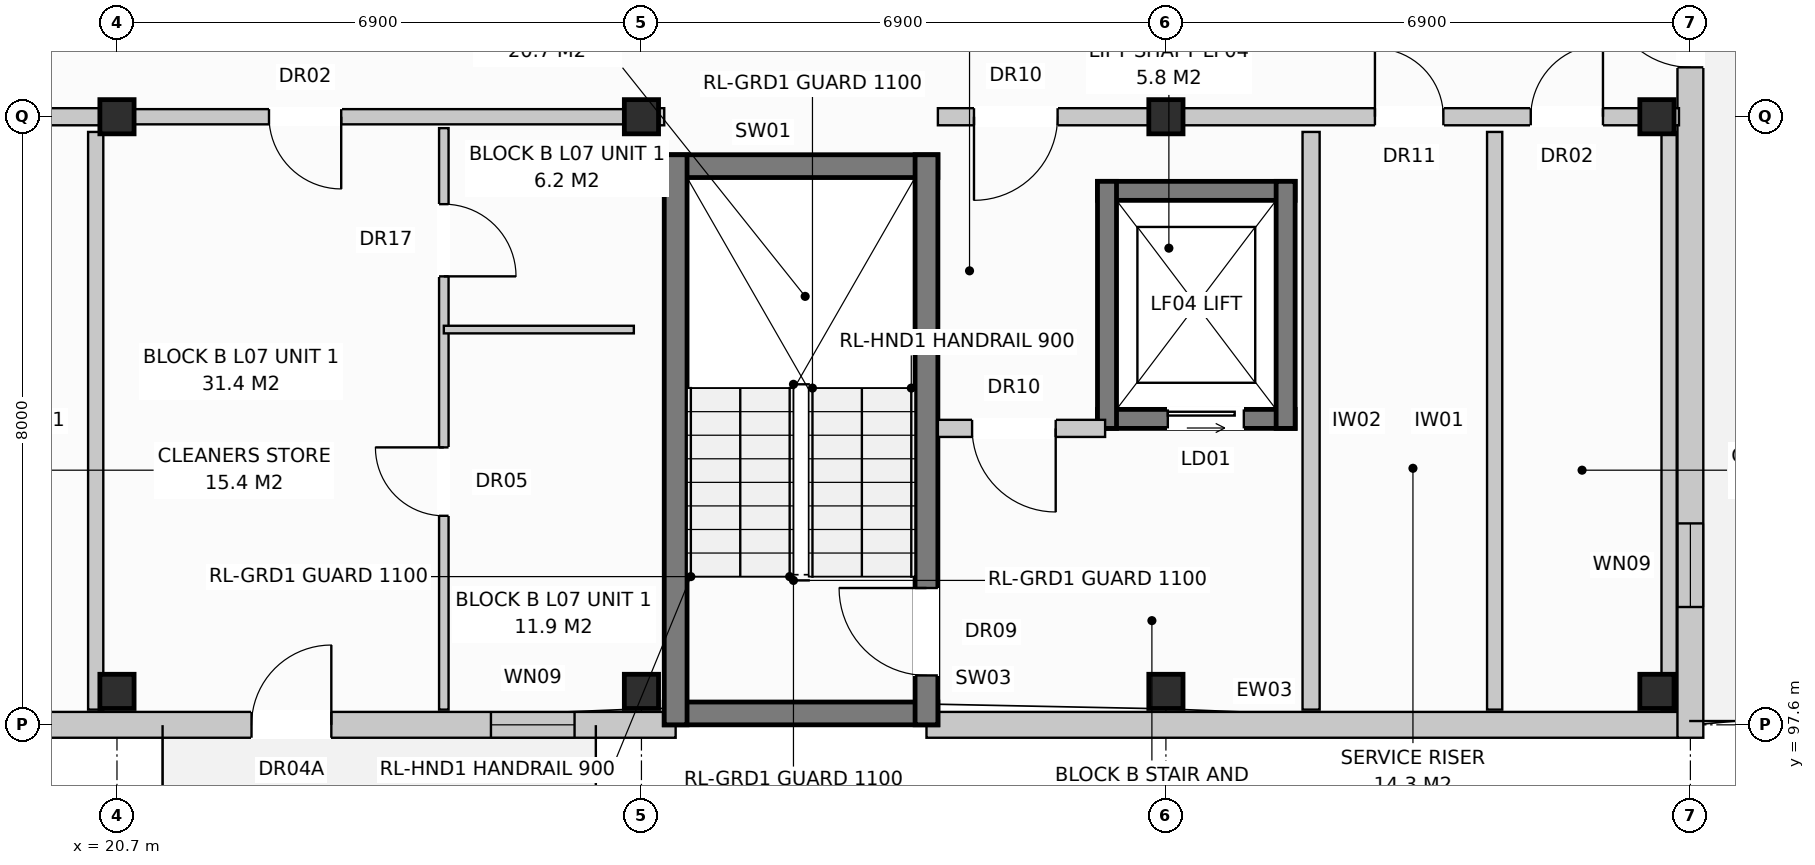
"""IFC4 building model, lengths in metres.
Left out: names, types, materials, properties, quantities, classifications, styles, units other than length and angle.
Written with IfcOpenShell. Run it as: python <this file> out.ifc"""

import sys

from ifc_helpers import new_model, si_unit, direction, frame, frame_2d, origin, origin_with_axes, origin_2d, place, context, subcontext, project, spatial, rectangle, extrude, element, fill, save


model = new_model("IFC4")
c1 = context("Model", 3, precision=1e-05, world=origin(), true_north=direction((0.0, 1.0)))
c2 = subcontext(c1, "Body", "Model", "MODEL_VIEW")
j1 = project(units=[si_unit("LENGTHUNIT", "METRE"), si_unit("PLANEANGLEUNIT", "RADIAN")], contexts=[c1])
p1 = place(None, origin())
s1 = spatial("IfcSite", under=j1, at=p1, CompositionType="ELEMENT")
p2 = place(p1, origin())
s2 = spatial("IfcBuilding", under=s1, at=p2, CompositionType="ELEMENT")
p3 = place(p2, frame((0.0, 0.0, 24.0)))
s3 = spatial("IfcBuildingStorey", under=s2, at=p3, CompositionType="ELEMENT", Elevation=24.0)
for number, where, z_axis, x_axis in (
    (1, (20.7, 98.04, 0.0), (0.0, 0.0, 1.0), (1.0, 0.0, 0.0)),
    (2, (20.7, 105.6, 0.0), (0.0, 0.0, 1.0), (1.0, 0.0, 0.0)),
    (3, (27.6, 98.04, 0.0), (0.0, 0.0, 1.0), (1.0, 0.0, 0.0)),
    (4, (27.6, 105.6, 0.0), (0.0, 0.0, 1.0), (1.0, 0.0, 0.0)),
    (5, (34.5, 98.04, 0.0), (0.0, 0.0, 1.0), (1.0, 0.0, 0.0)),
    (6, (34.5, 105.6, 0.0), (0.0, 0.0, 1.0), (1.0, 0.0, 0.0)),
    (7, (40.96, 98.04, 0.0), (0.0, 0.0, 1.0), (1.0, 0.0, 0.0)),
    (8, (40.96, 105.6, 0.0), (0.0, 0.0, 1.0), (1.0, 0.0, 0.0)),
):
    element("IfcColumn", number, at=place(p3, frame(where, z_axis=z_axis, x_axis=x_axis)), inside=s3, PredefinedType="COLUMN", context=c2, shape_type="SweptSolid", body=[
        extrude(rectangle(XDim=0.45, YDim=0.45, at=origin_2d()), origin(), (0.0, 0.0, 1.0), 3.2),
    ])
p4 = place(p3, frame((10.65, 97.6, 0.0), z_axis=(0.0, 0.0, 1.0), x_axis=(1.0, 0.0, 0.0)))
e9 = element("IfcWall", 9, at=p4, inside=s3, PredefinedType="STANDARD", context=c2, shape_type="SweptSolid", body=[
    extrude(rectangle(XDim=17.4, YDim=0.34, at=frame_2d((8.7, 0.0))), origin(), (0.0, 0.0, 1.0), 2.95),
])
p5 = place(p4, frame((11.82, 0.0, 0.0)))
e10 = element("IfcOpeningElement", 10, at=p5, cuts=e9, PredefinedType="OPENING", context=c2, shape_type="SweptSolid", body=[
    extrude(rectangle(XDim=1.05, YDim=2.12, at=frame_2d((0.525, 1.06))), frame((0.0, 0.182, 0.0), z_axis=(0.0, -1.0, 0.0), x_axis=(1.0, 0.0, 0.0)), (0.0, 0.0, 1.0), 0.364),
])
p6 = place(p4, frame((14.97, 0.0, 0.72)))
e11 = element("IfcOpeningElement", 11, at=p6, cuts=e9, PredefinedType="OPENING", context=c2, shape_type="SweptSolid", body=[
    extrude(rectangle(XDim=1.1, YDim=1.5, at=frame_2d((0.55, 0.75))), frame((0.0, 0.182, 0.0), z_axis=(0.0, -1.0, 0.0), x_axis=(1.0, 0.0, 0.0)), (0.0, 0.0, 1.0), 0.364),
])
p7 = place(p3, frame((31.35, 97.6, 0.0), z_axis=(0.0, 0.0, 1.0), x_axis=(1.0, 0.0, 0.0)))
e12 = element("IfcWall", 12, at=p7, inside=s3, PredefinedType="STANDARD", context=c2, shape_type="SweptSolid", body=[
    extrude(rectangle(XDim=9.89, YDim=0.34, at=frame_2d((4.945, 0.0))), origin(), (0.0, 0.0, 1.0), 2.95),
])
p8 = place(p3, frame((41.4, 97.43, 0.0), z_axis=(0.0, 0.0, 1.0), x_axis=(0.0, 1.0, 0.0)))
e13 = element("IfcWall", 13, at=p8, inside=s3, PredefinedType="STANDARD", context=c2, shape_type="SweptSolid", body=[
    extrude(rectangle(XDim=18.74, YDim=0.34, at=frame_2d((9.37, 0.0))), origin(), (0.0, 0.0, 1.0), 2.95),
])
p9 = place(p8, frame((8.82, 0.0, 0.0)))
e14 = element("IfcOpeningElement", 14, at=p9, cuts=e13, PredefinedType="OPENING", context=c2, shape_type="SweptSolid", body=[
    extrude(rectangle(XDim=1.1, YDim=2.1, at=frame_2d((0.55, 1.05))), frame((0.0, 0.182, 0.0), z_axis=(0.0, -1.0, 0.0), x_axis=(1.0, 0.0, 0.0)), (0.0, 0.0, 1.0), 0.364),
])
p10 = place(p8, frame((15.82, 0.0, 0.0)))
e15 = element("IfcOpeningElement", 15, at=p10, cuts=e13, PredefinedType="OPENING", context=c2, shape_type="SweptSolid", body=[
    extrude(rectangle(XDim=1.1, YDim=2.1, at=frame_2d((0.55, 1.05))), frame((0.0, 0.182, 0.0), z_axis=(0.0, -1.0, 0.0), x_axis=(1.0, 0.0, 0.0)), (0.0, 0.0, 1.0), 0.364),
])
p11 = place(p8, frame((1.72, 0.0, 0.72)))
e16 = element("IfcOpeningElement", 16, at=p11, cuts=e13, PredefinedType="OPENING", context=c2, shape_type="SweptSolid", body=[
    extrude(rectangle(XDim=1.1, YDim=1.5, at=frame_2d((0.55, 0.75))), frame((0.0, 0.182, 0.0), z_axis=(0.0, -1.0, 0.0), x_axis=(1.0, 0.0, 0.0)), (0.0, 0.0, 1.0), 0.364),
])
p12 = place(p3, frame((20.42, 97.8, 0.0), z_axis=(0.0, 0.0, 1.0), x_axis=(0.0, 1.0, 0.0)))
e17 = element("IfcWall", 17, at=p12, inside=s3, PredefinedType="PARTITIONING", context=c2, shape_type="SweptSolid", body=[
    extrude(rectangle(XDim=7.6, YDim=0.2, at=frame_2d((3.8, 0.0))), origin(), (0.0, 0.0, 1.0), 2.95),
])
p13 = place(p3, frame((10.8, 105.6, 0.0), z_axis=(0.0, 0.0, 1.0), x_axis=(1.0, 0.0, 0.0)))
e18 = element("IfcWall", 18, at=p13, inside=s3, PredefinedType="PARTITIONING", context=c2, shape_type="SweptSolid", body=[
    extrude(rectangle(XDim=9.9, YDim=0.225, at=frame_2d((4.95, 0.0))), origin(), (0.0, 0.0, 1.0), 2.39),
])
p14 = place(p13, frame((0.475, 0.0, 0.0)))
e19 = element("IfcOpeningElement", 19, at=p14, cuts=e18, PredefinedType="OPENING", context=c2, shape_type="SweptSolid", body=[
    extrude(rectangle(XDim=1.1, YDim=2.15, at=frame_2d((0.55, 1.075))), frame((0.0, 0.125, 0.0), z_axis=(0.0, -1.0, 0.0), x_axis=(1.0, 0.0, 0.0)), (0.0, 0.0, 1.0), 0.249),
])
p15 = place(p13, frame((5.75, 0.0, 0.0)))
e20 = element("IfcOpeningElement", 20, at=p15, cuts=e18, PredefinedType="OPENING", context=c2, shape_type="SweptSolid", body=[
    extrude(rectangle(XDim=0.9, YDim=2.1, at=frame_2d((0.45, 1.05))), frame((0.0, 0.125, 0.0), z_axis=(0.0, -1.0, 0.0), x_axis=(1.0, 0.0, 0.0)), (0.0, 0.0, 1.0), 0.249),
])
p16 = place(p13, frame((7.8, 0.0, 0.0)))
e21 = element("IfcOpeningElement", 21, at=p16, cuts=e18, PredefinedType="OPENING", context=c2, shape_type="SweptSolid", body=[
    extrude(rectangle(XDim=0.95, YDim=2.15, at=frame_2d((0.475, 1.075))), frame((0.0, 0.125, 0.0), z_axis=(0.0, -1.0, 0.0), x_axis=(1.0, 0.0, 0.0)), (0.0, 0.0, 1.0), 0.249),
])
for number, where, z_axis, x_axis in (
    (22, (27.9, 97.75, 0.0), (0.0, 0.0, 1.0), (1.0, 0.0, 0.0)),
    (23, (27.9, 104.95, 0.0), (0.0, 0.0, 1.0), (1.0, 0.0, 0.0)),
):
    element("IfcWall", number, at=place(p3, frame(where, z_axis=z_axis, x_axis=x_axis)), inside=s3, PredefinedType="SHEAR", context=c2, shape_type="SweptSolid", body=[
        extrude(rectangle(XDim=3.6, YDim=0.3, at=frame_2d((1.8, 0.0))), origin(), (0.0, 0.0, 1.0), 2.95),
    ])
p17 = place(p3, frame((28.05, 97.6, 0.0), z_axis=(0.0, 0.0, 1.0), x_axis=(0.0, 1.0, 0.0)))
e24 = element("IfcWall", 24, at=p17, inside=s3, PredefinedType="SHEAR", context=c2, shape_type="SweptSolid", body=[
    extrude(rectangle(XDim=7.5, YDim=0.3, at=frame_2d((3.75, 0.0))), origin(), (0.0, 0.0, 1.0), 2.95),
])
p18 = place(p3, frame((31.35, 97.6, 0.0), z_axis=(0.0, 0.0, 1.0), x_axis=(0.0, 1.0, 0.0)))
e25 = element("IfcWall", 25, at=p18, inside=s3, PredefinedType="SHEAR", context=c2, shape_type="SweptSolid", body=[
    extrude(rectangle(XDim=7.5, YDim=0.3, at=frame_2d((3.75, 0.0))), origin(), (0.0, 0.0, 1.0), 2.95),
])
p19 = place(p18, frame((0.65, 0.0, 0.0)))
e26 = element("IfcOpeningElement", 26, at=p19, cuts=e25, PredefinedType="OPENING", context=c2, shape_type="SweptSolid", body=[
    extrude(rectangle(XDim=1.15, YDim=2.15, at=frame_2d((0.575, 1.075))), frame((0.0, 0.162, 0.0), z_axis=(0.0, -1.0, 0.0), x_axis=(1.0, 0.0, 0.0)), (0.0, 0.0, 1.0), 0.324),
])
p20 = place(p3, frame((33.6, 101.625, 0.0), z_axis=(0.0, 0.0, 1.0), x_axis=(1.0, 0.0, 0.0)))
e27 = element("IfcWall", 27, at=p20, inside=s3, PredefinedType="SHEAR", context=c2, shape_type="SweptSolid", body=[
    extrude(rectangle(XDim=2.6, YDim=0.25, at=frame_2d((1.3, 0.0))), origin(), (0.0, 0.0, 1.0), 2.95),
])
p21 = place(p20, frame((0.925, 0.0, 0.0)))
e28 = element("IfcOpeningElement", 28, at=p21, cuts=e27, PredefinedType="OPENING", context=c2, shape_type="SweptSolid", body=[
    extrude(rectangle(XDim=1.0, YDim=2.1, at=frame_2d((0.5, 1.05))), frame((0.0, 0.137, 0.0), z_axis=(0.0, -1.0, 0.0), x_axis=(1.0, 0.0, 0.0)), (0.0, 0.0, 1.0), 0.274),
])
p22 = place(p3, frame((33.6, 104.625, 0.0), z_axis=(0.0, 0.0, 1.0), x_axis=(1.0, 0.0, 0.0)))
e29 = element("IfcWall", 29, at=p22, inside=s3, PredefinedType="SHEAR", context=c2, shape_type="SweptSolid", body=[
    extrude(rectangle(XDim=2.6, YDim=0.25, at=frame_2d((1.3, 0.0))), origin(), (0.0, 0.0, 1.0), 2.95),
])
for number, where, z_axis, x_axis in (
    (30, (33.725, 101.5, 0.0), (0.0, 0.0, 1.0), (0.0, 1.0, 0.0)),
    (31, (36.075, 101.5, 0.0), (0.0, 0.0, 1.0), (0.0, 1.0, 0.0)),
):
    element("IfcWall", number, at=place(p3, frame(where, z_axis=z_axis, x_axis=x_axis)), inside=s3, PredefinedType="SHEAR", context=c2, shape_type="SweptSolid", body=[
        extrude(rectangle(XDim=3.25, YDim=0.25, at=frame_2d((1.625, 0.0))), origin(), (0.0, 0.0, 1.0), 2.95),
    ])
p23 = place(p3, frame((36.41, 97.8, 0.0), z_axis=(0.0, 0.0, 1.0), x_axis=(0.0, 1.0, 0.0)))
e32 = element("IfcWall", 32, at=p23, inside=s3, PredefinedType="PARTITIONING", context=c2, shape_type="SweptSolid", body=[
    extrude(rectangle(XDim=7.6, YDim=0.225, at=frame_2d((3.8, 0.0))), origin(), (0.0, 0.0, 1.0), 2.59),
])
p24 = place(p3, frame((31.5, 101.5, 0.0), z_axis=(0.0, 0.0, 1.0), x_axis=(1.0, 0.0, 0.0)))
e33 = element("IfcWall", 33, at=p24, inside=s3, PredefinedType="PARTITIONING", context=c2, shape_type="SweptSolid", body=[
    extrude(rectangle(XDim=2.2, YDim=0.225, at=frame_2d((1.1, 0.0))), origin(), (0.0, 0.0, 1.0), 2.95),
])
p25 = place(p24, frame((0.45, 0.0, 0.0)))
e34 = element("IfcOpeningElement", 34, at=p25, cuts=e33, PredefinedType="OPENING", context=c2, shape_type="SweptSolid", body=[
    extrude(rectangle(XDim=1.1, YDim=2.15, at=frame_2d((0.55, 1.075))), frame((0.0, 0.125, 0.0), z_axis=(0.0, -1.0, 0.0), x_axis=(1.0, 0.0, 0.0)), (0.0, 0.0, 1.0), 0.249),
])
p26 = place(p3, frame((27.6, 105.6, 0.0), z_axis=(0.0, 0.0, 1.0), x_axis=(1.0, 0.0, 0.0)))
e35 = element("IfcWall", 35, at=p26, inside=s3, PredefinedType="PARTITIONING", context=c2, shape_type="SweptSolid", body=[
    extrude(rectangle(XDim=0.3, YDim=0.225, at=frame_2d((0.15, 0.0))), origin(), (0.0, 0.0, 1.0), 2.95),
])
p27 = place(p3, frame((38.825, 97.8, 0.0), z_axis=(0.0, 0.0, 1.0), x_axis=(0.0, 1.0, 0.0)))
e36 = element("IfcWall", 36, at=p27, inside=s3, PredefinedType="PARTITIONING", context=c2, shape_type="SweptSolid", body=[
    extrude(rectangle(XDim=7.6, YDim=0.2, at=frame_2d((3.8, 0.0))), origin(), (0.0, 0.0, 1.0), 2.95),
])
p28 = place(p3, frame((41.12, 97.8, 0.0), z_axis=(0.0, 0.0, 1.0), x_axis=(0.0, 1.0, 0.0)))
e37 = element("IfcWall", 37, at=p28, inside=s3, PredefinedType="PARTITIONING", context=c2, shape_type="SweptSolid", body=[
    extrude(rectangle(XDim=7.6, YDim=0.2, at=frame_2d((3.8, 0.0))), origin(), (0.0, 0.0, 1.0), 2.39),
])
p29 = place(p3, frame((31.5, 105.6, 0.0), z_axis=(0.0, 0.0, 1.0), x_axis=(1.0, 0.0, 0.0)))
e38 = element("IfcWall", 38, at=p29, inside=s3, PredefinedType="PARTITIONING", context=c2, shape_type="SweptSolid", body=[
    extrude(rectangle(XDim=9.75, YDim=0.225, at=frame_2d((4.875, 0.0))), origin(), (0.0, 0.0, 1.0), 2.39),
])
p30 = place(p29, frame((0.475, 0.0, 0.0)))
e39 = element("IfcOpeningElement", 39, at=p30, cuts=e38, PredefinedType="OPENING", context=c2, shape_type="SweptSolid", body=[
    extrude(rectangle(XDim=1.1, YDim=2.15, at=frame_2d((0.55, 1.075))), frame((0.0, 0.125, 0.0), z_axis=(0.0, -1.0, 0.0), x_axis=(1.0, 0.0, 0.0)), (0.0, 0.0, 1.0), 0.249),
])
p31 = place(p29, frame((5.75, 0.0, 0.0)))
e40 = element("IfcOpeningElement", 40, at=p31, cuts=e38, PredefinedType="OPENING", context=c2, shape_type="SweptSolid", body=[
    extrude(rectangle(XDim=0.9, YDim=2.1, at=frame_2d((0.45, 1.05))), frame((0.0, 0.125, 0.0), z_axis=(0.0, -1.0, 0.0), x_axis=(1.0, 0.0, 0.0)), (0.0, 0.0, 1.0), 0.249),
])
p32 = place(p29, frame((7.8, 0.0, 0.0)))
e41 = element("IfcOpeningElement", 41, at=p32, cuts=e38, PredefinedType="OPENING", context=c2, shape_type="SweptSolid", body=[
    extrude(rectangle(XDim=0.95, YDim=2.15, at=frame_2d((0.475, 1.075))), frame((0.0, 0.125, 0.0), z_axis=(0.0, -1.0, 0.0), x_axis=(1.0, 0.0, 0.0)), (0.0, 0.0, 1.0), 0.249),
])
p33 = place(p3, frame((20.7, 105.6, 0.0), z_axis=(0.0, 0.0, 1.0), x_axis=(1.0, 0.0, 0.0)))
e42 = element("IfcWall", 42, at=p33, inside=s3, PredefinedType="PARTITIONING", context=c2, shape_type="SweptSolid", body=[
    extrude(rectangle(XDim=6.9, YDim=0.2, at=frame_2d((3.45, 0.0))), origin(), (0.0, 0.0, 1.0), 2.39),
])
p34 = place(p33, frame((2.0, 0.0, 0.0)))
e43 = element("IfcOpeningElement", 43, at=p34, cuts=e42, PredefinedType="OPENING", context=c2, shape_type="SweptSolid", body=[
    extrude(rectangle(XDim=0.95, YDim=2.15, at=frame_2d((0.475, 1.075))), frame((0.0, 0.112, 0.0), z_axis=(0.0, -1.0, 0.0), x_axis=(1.0, 0.0, 0.0)), (0.0, 0.0, 1.0), 0.224),
])
p35 = place(p3, frame((25.0, 105.45, 0.0), z_axis=(0.0, 0.0, 1.0), x_axis=(0.0, -1.0, 0.0)))
e44 = element("IfcWall", 44, at=p35, inside=s3, PredefinedType="PARTITIONING", context=c2, shape_type="SweptSolid", body=[
    extrude(rectangle(XDim=7.65, YDim=0.125, at=frame_2d((3.825, 0.0))), origin(), (0.0, 0.0, 1.0), 2.95),
])
p36 = place(p35, frame((1.0, 0.0, 0.0)))
e45 = element("IfcOpeningElement", 45, at=p36, cuts=e44, PredefinedType="OPENING", context=c2, shape_type="SweptSolid", body=[
    extrude(rectangle(XDim=0.95, YDim=2.1, at=frame_2d((0.475, 1.05))), frame((0.0, 0.074, 0.0), z_axis=(0.0, -1.0, 0.0), x_axis=(1.0, 0.0, 0.0)), (0.0, 0.0, 1.0), 0.149),
])
p37 = place(p35, frame((4.2, 0.0, 0.0)))
e46 = element("IfcOpeningElement", 46, at=p37, cuts=e44, PredefinedType="OPENING", context=c2, shape_type="SweptSolid", body=[
    extrude(rectangle(XDim=0.9, YDim=2.1, at=frame_2d((0.45, 1.05))), frame((0.0, 0.074, 0.0), z_axis=(0.0, -1.0, 0.0), x_axis=(1.0, 0.0, 0.0)), (0.0, 0.0, 1.0), 0.149),
])
p38 = place(p3, frame((25.0, 102.8, 0.0), z_axis=(0.0, 0.0, 1.0), x_axis=(1.0, 0.0, 0.0)))
e47 = element("IfcWall", 47, at=p38, inside=s3, PredefinedType="PARTITIONING", context=c2, shape_type="SweptSolid", body=[
    extrude(rectangle(XDim=2.5, YDim=0.1, at=frame_2d((1.25, 0.0))), origin(), (0.0, 0.0, 1.0), 2.95),
])
p39 = place(p5, origin_with_axes())
e48 = element("IfcDoor", 48, at=p39, inside=s3, OperationType="SINGLE_SWING_RIGHT", PredefinedType="DOOR", context=c2, shape_type="SweptSolid", body=[
    extrude(rectangle(XDim=1.05, YDim=2.12, at=frame_2d((0.525, 1.06))), frame((0.0, 0.025, 0.0), z_axis=(0.0, -1.0, 0.0), x_axis=(1.0, 0.0, 0.0)), (0.0, 0.0, 1.0), 0.05),
])
fill(e10, e48)
p40 = place(p6, origin_with_axes())
e49 = element("IfcWindow", 49, at=p40, inside=s3, PartitioningType="SINGLE_PANEL", PredefinedType="WINDOW", context=c2, shape_type="SweptSolid", body=[
    extrude(rectangle(XDim=1.1, YDim=1.5, at=frame_2d((0.55, 0.75))), frame((0.0, 0.03, 0.0), z_axis=(0.0, -1.0, 0.0), x_axis=(1.0, 0.0, 0.0)), (0.0, 0.0, 1.0), 0.06),
])
fill(e11, e49)
p41 = place(p9, origin_with_axes())
e50 = element("IfcDoor", 50, at=p41, inside=s3, OperationType="SINGLE_SWING_RIGHT", PredefinedType="DOOR", context=c2, shape_type="SweptSolid", body=[
    extrude(rectangle(XDim=1.1, YDim=2.1, at=frame_2d((0.55, 1.05))), frame((0.0, 0.025, 0.0), z_axis=(0.0, -1.0, 0.0), x_axis=(1.0, 0.0, 0.0)), (0.0, 0.0, 1.0), 0.05),
])
fill(e14, e50)
p42 = place(p11, origin_with_axes())
e51 = element("IfcWindow", 51, at=p42, inside=s3, PartitioningType="SINGLE_PANEL", PredefinedType="WINDOW", context=c2, shape_type="SweptSolid", body=[
    extrude(rectangle(XDim=1.1, YDim=1.5, at=frame_2d((0.55, 0.75))), frame((0.0, 0.03, 0.0), z_axis=(0.0, -1.0, 0.0), x_axis=(1.0, 0.0, 0.0)), (0.0, 0.0, 1.0), 0.06),
])
fill(e16, e51)
p43 = place(p19, origin_with_axes())
e52 = element("IfcDoor", 52, at=p43, inside=s3, OperationType="SINGLE_SWING_RIGHT", PredefinedType="DOOR", context=c2, shape_type="SweptSolid", body=[
    extrude(rectangle(XDim=1.15, YDim=2.15, at=frame_2d((0.575, 1.075))), frame((0.0, 0.025, 0.0), z_axis=(0.0, -1.0, 0.0), x_axis=(1.0, 0.0, 0.0)), (0.0, 0.0, 1.0), 0.05),
])
fill(e26, e52)
p44 = place(p21, origin_with_axes())
e53 = element("IfcDoor", 53, at=p44, inside=s3, OperationType="SLIDING_TO_LEFT", PredefinedType="DOOR", context=c2, shape_type="SweptSolid", body=[
    extrude(rectangle(XDim=1.0, YDim=2.1, at=frame_2d((0.5, 1.05))), frame((0.0, 0.025, 0.0), z_axis=(0.0, -1.0, 0.0), x_axis=(1.0, 0.0, 0.0)), (0.0, 0.0, 1.0), 0.05),
])
fill(e28, e53)
p45 = place(p25, frame((1.1, 0.0, 0.0), z_axis=(0.0, 0.0, 1.0), x_axis=(-1.0, 0.0, 0.0)))
e54 = element("IfcDoor", 54, at=p45, inside=s3, OperationType="SINGLE_SWING_RIGHT", PredefinedType="DOOR", context=c2, shape_type="SweptSolid", body=[
    extrude(rectangle(XDim=1.1, YDim=2.15, at=frame_2d((0.55, 1.075))), frame((0.0, 0.025, 0.0), z_axis=(0.0, -1.0, 0.0), x_axis=(1.0, 0.0, 0.0)), (0.0, 0.0, 1.0), 0.05),
])
fill(e34, e54)
p46 = place(p30, frame((1.1, 0.0, 0.0), z_axis=(0.0, 0.0, 1.0), x_axis=(-1.0, 0.0, 0.0)))
e55 = element("IfcDoor", 55, at=p46, inside=s3, OperationType="SINGLE_SWING_LEFT", PredefinedType="DOOR", context=c2, shape_type="SweptSolid", body=[
    extrude(rectangle(XDim=1.1, YDim=2.15, at=frame_2d((0.55, 1.075))), frame((0.0, 0.025, 0.0), z_axis=(0.0, -1.0, 0.0), x_axis=(1.0, 0.0, 0.0)), (0.0, 0.0, 1.0), 0.05),
])
fill(e39, e55)
p47 = place(p31, origin_with_axes())
e56 = element("IfcDoor", 56, at=p47, inside=s3, OperationType="SINGLE_SWING_LEFT", PredefinedType="DOOR", context=c2, shape_type="SweptSolid", body=[
    extrude(rectangle(XDim=0.9, YDim=2.1, at=frame_2d((0.45, 1.05))), frame((0.0, 0.025, 0.0), z_axis=(0.0, -1.0, 0.0), x_axis=(1.0, 0.0, 0.0)), (0.0, 0.0, 1.0), 0.05),
])
fill(e40, e56)
p48 = place(p32, origin_with_axes())
e57 = element("IfcDoor", 57, at=p48, inside=s3, OperationType="SINGLE_SWING_RIGHT", PredefinedType="DOOR", context=c2, shape_type="SweptSolid", body=[
    extrude(rectangle(XDim=0.95, YDim=2.15, at=frame_2d((0.475, 1.075))), frame((0.0, 0.025, 0.0), z_axis=(0.0, -1.0, 0.0), x_axis=(1.0, 0.0, 0.0)), (0.0, 0.0, 1.0), 0.05),
])
fill(e41, e57)
p49 = place(p34, frame((0.95, 0.0, 0.0), z_axis=(0.0, 0.0, 1.0), x_axis=(-1.0, 0.0, 0.0)))
e58 = element("IfcDoor", 58, at=p49, inside=s3, OperationType="SINGLE_SWING_RIGHT", PredefinedType="DOOR", context=c2, shape_type="SweptSolid", body=[
    extrude(rectangle(XDim=0.95, YDim=2.15, at=frame_2d((0.475, 1.075))), frame((0.0, 0.025, 0.0), z_axis=(0.0, -1.0, 0.0), x_axis=(1.0, 0.0, 0.0)), (0.0, 0.0, 1.0), 0.05),
])
fill(e43, e58)
p50 = place(p36, origin_with_axes())
e59 = element("IfcDoor", 59, at=p50, inside=s3, OperationType="SINGLE_SWING_RIGHT", PredefinedType="DOOR", context=c2, shape_type="SweptSolid", body=[
    extrude(rectangle(XDim=0.95, YDim=2.1, at=frame_2d((0.475, 1.05))), frame((0.0, 0.025, 0.0), z_axis=(0.0, -1.0, 0.0), x_axis=(1.0, 0.0, 0.0)), (0.0, 0.0, 1.0), 0.05),
])
fill(e45, e59)
p51 = place(p37, frame((0.9, 0.0, 0.0), z_axis=(0.0, 0.0, 1.0), x_axis=(-1.0, 0.0, 0.0)))
e60 = element("IfcDoor", 60, at=p51, inside=s3, OperationType="SINGLE_SWING_LEFT", PredefinedType="DOOR", context=c2, shape_type="SweptSolid", body=[
    extrude(rectangle(XDim=0.9, YDim=2.1, at=frame_2d((0.45, 1.05))), frame((0.0, 0.025, 0.0), z_axis=(0.0, -1.0, 0.0), x_axis=(1.0, 0.0, 0.0)), (0.0, 0.0, 1.0), 0.05),
])
fill(e46, e60)
save(model, sys.argv[1])
